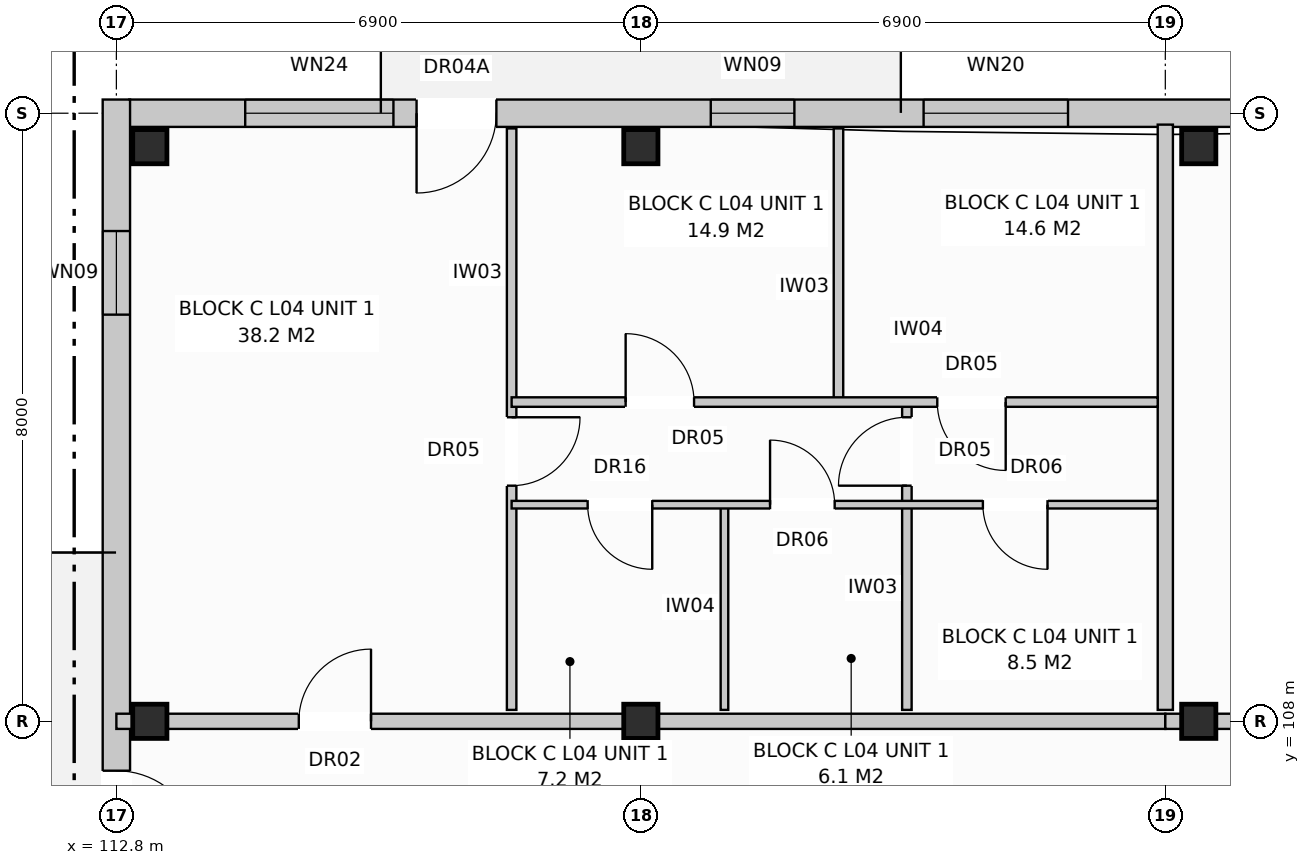
"""IFC4 building model, lengths in metres.
Left out: names, types, materials, properties, quantities, classifications, styles, units other than length and angle.
Written with IfcOpenShell. Run it as: python <this file> out.ifc"""

import sys

from ifc_helpers import new_model, si_unit, direction, frame, frame_2d, origin, origin_with_axes, origin_2d, place, context, subcontext, project, spatial, rectangle, extrude, element, fill, save


model = new_model("IFC4")
c1 = context("Model", 3, precision=1e-05, world=origin(), true_north=direction((0.0, 1.0)))
c2 = subcontext(c1, "Body", "Model", "MODEL_VIEW")
j1 = project(units=[si_unit("LENGTHUNIT", "METRE"), si_unit("PLANEANGLEUNIT", "RADIAN")], contexts=[c1])
p1 = place(None, origin())
s1 = spatial("IfcSite", under=j1, at=p1, CompositionType="ELEMENT")
p2 = place(p1, origin())
s2 = spatial("IfcBuilding", under=s1, at=p2, CompositionType="ELEMENT")
p3 = place(p2, frame((0.0, 0.0, 14.4)))
s3 = spatial("IfcBuildingStorey", under=s2, at=p3, CompositionType="ELEMENT", Elevation=14.4)
for number, where, z_axis, x_axis in (
    (1, (113.24, 108.0, 0.0), (0.0, 0.0, 1.0), (1.0, 0.0, 0.0)),
    (2, (113.24, 115.56, 0.0), (0.0, 0.0, 1.0), (1.0, 0.0, 0.0)),
    (3, (119.7, 108.0, 0.0), (0.0, 0.0, 1.0), (1.0, 0.0, 0.0)),
    (4, (119.7, 115.56, 0.0), (0.0, 0.0, 1.0), (1.0, 0.0, 0.0)),
    (5, (127.04, 108.0, 0.0), (0.0, 0.0, 1.0), (1.0, 0.0, 0.0)),
    (6, (127.04, 115.56, 0.0), (0.0, 0.0, 1.0), (1.0, 0.0, 0.0)),
):
    element("IfcColumn", number, at=place(p3, frame(where, z_axis=z_axis, x_axis=x_axis)), inside=s3, PredefinedType="COLUMN", context=c2, shape_type="SweptSolid", body=[
        extrude(rectangle(XDim=0.45, YDim=0.45, at=origin_2d()), origin(), (0.0, 0.0, 1.0), 3.2),
    ])
p4 = place(p3, frame((112.97, 116.0, 0.0), z_axis=(0.0, 0.0, 1.0), x_axis=(1.0, 0.0, 0.0)))
e7 = element("IfcWall", 7, at=p4, inside=s3, PredefinedType="STANDARD", context=c2, shape_type="SweptSolid", body=[
    extrude(rectangle(XDim=54.86, YDim=0.36, at=frame_2d((27.43, 0.0))), origin(), (0.0, 0.0, 1.0), 2.94),
])
p5 = place(p4, frame((3.779, 0.0, 0.0)))
e8 = element("IfcOpeningElement", 8, at=p5, cuts=e7, PredefinedType="OPENING", context=c2, shape_type="SweptSolid", body=[
    extrude(rectangle(XDim=1.05, YDim=2.12, at=frame_2d((0.525, 1.06))), frame((0.0, 0.192, 0.0), z_axis=(0.0, -1.0, 0.0), x_axis=(1.0, 0.0, 0.0)), (0.0, 0.0, 1.0), 0.384),
])
p6 = place(p4, frame((18.639, 0.0, 0.0)))
e9 = element("IfcOpeningElement", 9, at=p6, cuts=e7, PredefinedType="OPENING", context=c2, shape_type="SweptSolid", body=[
    extrude(rectangle(XDim=1.05, YDim=2.12, at=frame_2d((0.525, 1.06))), frame((0.0, 0.192, 0.0), z_axis=(0.0, -1.0, 0.0), x_axis=(1.0, 0.0, 0.0)), (0.0, 0.0, 1.0), 0.384),
])
p7 = place(p4, frame((29.039, 0.0, 0.0)))
e10 = element("IfcOpeningElement", 10, at=p7, cuts=e7, PredefinedType="OPENING", context=c2, shape_type="SweptSolid", body=[
    extrude(rectangle(XDim=1.05, YDim=2.12, at=frame_2d((0.525, 1.06))), frame((0.0, 0.192, 0.0), z_axis=(0.0, -1.0, 0.0), x_axis=(1.0, 0.0, 0.0)), (0.0, 0.0, 1.0), 0.384),
])
p8 = place(p4, frame((46.45, 0.0, 0.0)))
e11 = element("IfcOpeningElement", 11, at=p8, cuts=e7, PredefinedType="OPENING", context=c2, shape_type="SweptSolid", body=[
    extrude(rectangle(XDim=1.05, YDim=2.12, at=frame_2d((0.525, 1.06))), frame((0.0, 0.192, 0.0), z_axis=(0.0, -1.0, 0.0), x_axis=(1.0, 0.0, 0.0)), (0.0, 0.0, 1.0), 0.384),
])
p9 = place(p4, frame((1.525, 0.0, 0.8)))
e12 = element("IfcOpeningElement", 12, at=p9, cuts=e7, PredefinedType="OPENING", context=c2, shape_type="SweptSolid", body=[
    extrude(rectangle(XDim=1.95, YDim=1.65, at=frame_2d((0.975, 0.825))), frame((0.0, 0.192, 0.0), z_axis=(0.0, -1.0, 0.0), x_axis=(1.0, 0.0, 0.0)), (0.0, 0.0, 1.0), 0.384),
])
p10 = place(p4, frame((7.65, 0.0, 0.72)))
e13 = element("IfcOpeningElement", 13, at=p10, cuts=e7, PredefinedType="OPENING", context=c2, shape_type="SweptSolid", body=[
    extrude(rectangle(XDim=1.1, YDim=1.5, at=frame_2d((0.55, 0.75))), frame((0.0, 0.192, 0.0), z_axis=(0.0, -1.0, 0.0), x_axis=(1.0, 0.0, 0.0)), (0.0, 0.0, 1.0), 0.384),
])
p11 = place(p4, frame((10.45, 0.0, 0.8)))
e14 = element("IfcOpeningElement", 14, at=p11, cuts=e7, PredefinedType="OPENING", context=c2, shape_type="SweptSolid", body=[
    extrude(rectangle(XDim=1.9, YDim=1.85, at=frame_2d((0.95, 0.925))), frame((0.0, 0.192, 0.0), z_axis=(0.0, -1.0, 0.0), x_axis=(1.0, 0.0, 0.0)), (0.0, 0.0, 1.0), 0.384),
])
p12 = place(p4, frame((15.825, 0.0, 0.8)))
e15 = element("IfcOpeningElement", 15, at=p12, cuts=e7, PredefinedType="OPENING", context=c2, shape_type="SweptSolid", body=[
    extrude(rectangle(XDim=1.95, YDim=1.65, at=frame_2d((0.975, 0.825))), frame((0.0, 0.192, 0.0), z_axis=(0.0, -1.0, 0.0), x_axis=(1.0, 0.0, 0.0)), (0.0, 0.0, 1.0), 0.384),
])
p13 = place(p4, frame((21.6, 0.0, 0.8)))
e16 = element("IfcOpeningElement", 16, at=p13, cuts=e7, PredefinedType="OPENING", context=c2, shape_type="SweptSolid", body=[
    extrude(rectangle(XDim=1.8, YDim=1.7, at=frame_2d((0.9, 0.85))), frame((0.0, 0.192, 0.0), z_axis=(0.0, -1.0, 0.0), x_axis=(1.0, 0.0, 0.0)), (0.0, 0.0, 1.0), 0.384),
])
p14 = place(p4, frame((25.6, 0.0, 0.72)))
e17 = element("IfcOpeningElement", 17, at=p14, cuts=e7, PredefinedType="OPENING", context=c2, shape_type="SweptSolid", body=[
    extrude(rectangle(XDim=1.1, YDim=1.5, at=frame_2d((0.55, 0.75))), frame((0.0, 0.192, 0.0), z_axis=(0.0, -1.0, 0.0), x_axis=(1.0, 0.0, 0.0)), (0.0, 0.0, 1.0), 0.384),
])
p15 = place(p4, frame((31.325, 0.0, 0.8)))
e18 = element("IfcOpeningElement", 18, at=p15, cuts=e7, PredefinedType="OPENING", context=c2, shape_type="SweptSolid", body=[
    extrude(rectangle(XDim=1.95, YDim=1.65, at=frame_2d((0.975, 0.825))), frame((0.0, 0.192, 0.0), z_axis=(0.0, -1.0, 0.0), x_axis=(1.0, 0.0, 0.0)), (0.0, 0.0, 1.0), 0.384),
])
p16 = place(p4, frame((35.6, 0.0, 0.8)))
e19 = element("IfcOpeningElement", 19, at=p16, cuts=e7, PredefinedType="OPENING", context=c2, shape_type="SweptSolid", body=[
    extrude(rectangle(XDim=1.8, YDim=1.7, at=frame_2d((0.9, 0.85))), frame((0.0, 0.192, 0.0), z_axis=(0.0, -1.0, 0.0), x_axis=(1.0, 0.0, 0.0)), (0.0, 0.0, 1.0), 0.384),
])
p17 = place(p4, frame((39.25, 0.0, 0.72)))
e20 = element("IfcOpeningElement", 20, at=p17, cuts=e7, PredefinedType="OPENING", context=c2, shape_type="SweptSolid", body=[
    extrude(rectangle(XDim=1.1, YDim=1.5, at=frame_2d((0.55, 0.75))), frame((0.0, 0.192, 0.0), z_axis=(0.0, -1.0, 0.0), x_axis=(1.0, 0.0, 0.0)), (0.0, 0.0, 1.0), 0.384),
])
p18 = place(p4, frame((44.225, 0.0, 0.8)))
e21 = element("IfcOpeningElement", 21, at=p18, cuts=e7, PredefinedType="OPENING", context=c2, shape_type="SweptSolid", body=[
    extrude(rectangle(XDim=1.95, YDim=1.65, at=frame_2d((0.975, 0.825))), frame((0.0, 0.192, 0.0), z_axis=(0.0, -1.0, 0.0), x_axis=(1.0, 0.0, 0.0)), (0.0, 0.0, 1.0), 0.384),
])
p19 = place(p4, frame((49.2, 0.0, 0.8)))
e22 = element("IfcOpeningElement", 22, at=p19, cuts=e7, PredefinedType="OPENING", context=c2, shape_type="SweptSolid", body=[
    extrude(rectangle(XDim=1.8, YDim=1.7, at=frame_2d((0.9, 0.85))), frame((0.0, 0.192, 0.0), z_axis=(0.0, -1.0, 0.0), x_axis=(1.0, 0.0, 0.0)), (0.0, 0.0, 1.0), 0.384),
])
p20 = place(p4, frame((52.95, 0.0, 0.72)))
e23 = element("IfcOpeningElement", 23, at=p20, cuts=e7, PredefinedType="OPENING", context=c2, shape_type="SweptSolid", body=[
    extrude(rectangle(XDim=1.1, YDim=1.5, at=frame_2d((0.55, 0.75))), frame((0.0, 0.192, 0.0), z_axis=(0.0, -1.0, 0.0), x_axis=(1.0, 0.0, 0.0)), (0.0, 0.0, 1.0), 0.384),
])
p21 = place(p3, frame((112.8, 97.42, 0.0), z_axis=(0.0, 0.0, 1.0), x_axis=(0.0, 1.0, 0.0)))
e24 = element("IfcWall", 24, at=p21, inside=s3, PredefinedType="STANDARD", context=c2, shape_type="SweptSolid", body=[
    extrude(rectangle(XDim=18.76, YDim=0.36, at=frame_2d((9.38, 0.0))), origin(), (0.0, 0.0, 1.0), 2.94),
])
p22 = place(p21, frame((8.83, 0.0, 0.0)))
e25 = element("IfcOpeningElement", 25, at=p22, cuts=e24, PredefinedType="OPENING", context=c2, shape_type="SweptSolid", body=[
    extrude(rectangle(XDim=1.1, YDim=2.1, at=frame_2d((0.55, 1.05))), frame((0.0, 0.192, 0.0), z_axis=(0.0, -1.0, 0.0), x_axis=(1.0, 0.0, 0.0)), (0.0, 0.0, 1.0), 0.384),
])
p23 = place(p21, frame((1.73, 0.0, 0.72)))
e26 = element("IfcOpeningElement", 26, at=p23, cuts=e24, PredefinedType="OPENING", context=c2, shape_type="SweptSolid", body=[
    extrude(rectangle(XDim=1.1, YDim=1.5, at=frame_2d((0.55, 0.75))), frame((0.0, 0.192, 0.0), z_axis=(0.0, -1.0, 0.0), x_axis=(1.0, 0.0, 0.0)), (0.0, 0.0, 1.0), 0.384),
])
p24 = place(p21, frame((15.93, 0.0, 0.72)))
e27 = element("IfcOpeningElement", 27, at=p24, cuts=e24, PredefinedType="OPENING", context=c2, shape_type="SweptSolid", body=[
    extrude(rectangle(XDim=1.1, YDim=1.5, at=frame_2d((0.55, 0.75))), frame((0.0, 0.192, 0.0), z_axis=(0.0, -1.0, 0.0), x_axis=(1.0, 0.0, 0.0)), (0.0, 0.0, 1.0), 0.384),
])
p25 = place(p3, frame((126.6, 108.15, 0.0), z_axis=(0.0, 0.0, 1.0), x_axis=(0.0, 1.0, 0.0)))
e28 = element("IfcWall", 28, at=p25, inside=s3, PredefinedType="PARTITIONING", context=c2, shape_type="SweptSolid", body=[
    extrude(rectangle(XDim=7.7, YDim=0.2, at=frame_2d((3.85, 0.0))), origin(), (0.0, 0.0, 1.0), 2.94),
])
p26 = place(p3, frame((112.8, 108.0, 0.0), z_axis=(0.0, 0.0, 1.0), x_axis=(1.0, 0.0, 0.0)))
e29 = element("IfcWall", 29, at=p26, inside=s3, PredefinedType="PARTITIONING", context=c2, shape_type="SweptSolid", body=[
    extrude(rectangle(XDim=13.8, YDim=0.2, at=frame_2d((6.9, 0.0))), origin(), (0.0, 0.0, 1.0), 2.38),
])
p27 = place(p26, frame((2.4, 0.0, 0.0)))
e30 = element("IfcOpeningElement", 30, at=p27, cuts=e29, PredefinedType="OPENING", context=c2, shape_type="SweptSolid", body=[
    extrude(rectangle(XDim=0.95, YDim=2.15, at=frame_2d((0.475, 1.075))), frame((0.0, 0.112, 0.0), z_axis=(0.0, -1.0, 0.0), x_axis=(1.0, 0.0, 0.0)), (0.0, 0.0, 1.0), 0.224),
])
p28 = place(p3, frame((118.0, 108.15, 0.0), z_axis=(0.0, 0.0, 1.0), x_axis=(0.0, 1.0, 0.0)))
e31 = element("IfcWall", 31, at=p28, inside=s3, PredefinedType="PARTITIONING", context=c2, shape_type="SweptSolid", body=[
    extrude(rectangle(XDim=7.65, YDim=0.125, at=frame_2d((3.825, 0.0))), origin(), (0.0, 0.0, 1.0), 2.94),
])
p29 = place(p28, frame((2.95, 0.0, 0.0)))
e32 = element("IfcOpeningElement", 32, at=p29, cuts=e31, PredefinedType="OPENING", context=c2, shape_type="SweptSolid", body=[
    extrude(rectangle(XDim=0.9, YDim=2.1, at=frame_2d((0.45, 1.05))), frame((0.0, 0.074, 0.0), z_axis=(0.0, -1.0, 0.0), x_axis=(1.0, 0.0, 0.0)), (0.0, 0.0, 1.0), 0.149),
])
p30 = place(p3, frame((120.8, 108.15, 0.0), z_axis=(0.0, 0.0, 1.0), x_axis=(0.0, 1.0, 0.0)))
e33 = element("IfcWall", 33, at=p30, inside=s3, PredefinedType="PARTITIONING", context=c2, shape_type="SweptSolid", body=[
    extrude(rectangle(XDim=2.7, YDim=0.1, at=frame_2d((1.35, 0.0))), origin(), (0.0, 0.0, 1.0), 2.94),
])
p31 = place(p3, frame((123.2, 108.15, 0.0), z_axis=(0.0, 0.0, 1.0), x_axis=(0.0, 1.0, 0.0)))
e34 = element("IfcWall", 34, at=p31, inside=s3, PredefinedType="PARTITIONING", context=c2, shape_type="SweptSolid", body=[
    extrude(rectangle(XDim=4.05, YDim=0.125, at=frame_2d((2.025, 0.0))), origin(), (0.0, 0.0, 1.0), 2.94),
])
p32 = place(p31, frame((2.95, 0.0, 0.0)))
e35 = element("IfcOpeningElement", 35, at=p32, cuts=e34, PredefinedType="OPENING", context=c2, shape_type="SweptSolid", body=[
    extrude(rectangle(XDim=0.9, YDim=2.1, at=frame_2d((0.45, 1.05))), frame((0.0, 0.074, 0.0), z_axis=(0.0, -1.0, 0.0), x_axis=(1.0, 0.0, 0.0)), (0.0, 0.0, 1.0), 0.149),
])
p33 = place(p3, frame((122.3, 112.2, 0.0), z_axis=(0.0, 0.0, 1.0), x_axis=(0.0, 1.0, 0.0)))
e36 = element("IfcWall", 36, at=p33, inside=s3, PredefinedType="PARTITIONING", context=c2, shape_type="SweptSolid", body=[
    extrude(rectangle(XDim=3.6, YDim=0.125, at=frame_2d((1.8, 0.0))), origin(), (0.0, 0.0, 1.0), 2.59),
])
p34 = place(p3, frame((118.0, 110.85, 0.0), z_axis=(0.0, 0.0, 1.0), x_axis=(1.0, 0.0, 0.0)))
e37 = element("IfcWall", 37, at=p34, inside=s3, PredefinedType="PARTITIONING", context=c2, shape_type="SweptSolid", body=[
    extrude(rectangle(XDim=8.5, YDim=0.1, at=frame_2d((4.25, 0.0))), origin(), (0.0, 0.0, 1.0), 2.94),
])
p35 = place(p34, frame((1.0, 0.0, 0.0)))
e38 = element("IfcOpeningElement", 38, at=p35, cuts=e37, PredefinedType="OPENING", context=c2, shape_type="SweptSolid", body=[
    extrude(rectangle(XDim=0.85, YDim=2.1, at=frame_2d((0.425, 1.05))), frame((0.0, 0.062, 0.0), z_axis=(0.0, -1.0, 0.0), x_axis=(1.0, 0.0, 0.0)), (0.0, 0.0, 1.0), 0.124),
])
p36 = place(p34, frame((3.4, 0.0, 0.0)))
e39 = element("IfcOpeningElement", 39, at=p36, cuts=e37, PredefinedType="OPENING", context=c2, shape_type="SweptSolid", body=[
    extrude(rectangle(XDim=0.85, YDim=2.05, at=frame_2d((0.425, 1.025))), frame((0.0, 0.062, 0.0), z_axis=(0.0, -1.0, 0.0), x_axis=(1.0, 0.0, 0.0)), (0.0, 0.0, 1.0), 0.124),
])
p37 = place(p34, frame((6.2, 0.0, 0.0)))
e40 = element("IfcOpeningElement", 40, at=p37, cuts=e37, PredefinedType="OPENING", context=c2, shape_type="SweptSolid", body=[
    extrude(rectangle(XDim=0.85, YDim=2.05, at=frame_2d((0.425, 1.025))), frame((0.0, 0.062, 0.0), z_axis=(0.0, -1.0, 0.0), x_axis=(1.0, 0.0, 0.0)), (0.0, 0.0, 1.0), 0.124),
])
p38 = place(p3, frame((118.0, 112.2, 0.0), z_axis=(0.0, 0.0, 1.0), x_axis=(1.0, 0.0, 0.0)))
e41 = element("IfcWall", 41, at=p38, inside=s3, PredefinedType="PARTITIONING", context=c2, shape_type="SweptSolid", body=[
    extrude(rectangle(XDim=8.5, YDim=0.125, at=frame_2d((4.25, 0.0))), origin(), (0.0, 0.0, 1.0), 2.94),
])
p39 = place(p38, frame((1.5, 0.0, 0.0)))
e42 = element("IfcOpeningElement", 42, at=p39, cuts=e41, PredefinedType="OPENING", context=c2, shape_type="SweptSolid", body=[
    extrude(rectangle(XDim=0.9, YDim=2.1, at=frame_2d((0.45, 1.05))), frame((0.0, 0.074, 0.0), z_axis=(0.0, -1.0, 0.0), x_axis=(1.0, 0.0, 0.0)), (0.0, 0.0, 1.0), 0.149),
])
p40 = place(p38, frame((5.6, 0.0, 0.0)))
e43 = element("IfcOpeningElement", 43, at=p40, cuts=e41, PredefinedType="OPENING", context=c2, shape_type="SweptSolid", body=[
    extrude(rectangle(XDim=0.9, YDim=2.1, at=frame_2d((0.45, 1.05))), frame((0.0, 0.074, 0.0), z_axis=(0.0, -1.0, 0.0), x_axis=(1.0, 0.0, 0.0)), (0.0, 0.0, 1.0), 0.149),
])
p41 = place(p3, frame((126.6, 108.0, 0.0), z_axis=(0.0, 0.0, 1.0), x_axis=(1.0, 0.0, 0.0)))
e44 = element("IfcWall", 44, at=p41, inside=s3, PredefinedType="PARTITIONING", context=c2, shape_type="SweptSolid", body=[
    extrude(rectangle(XDim=20.7, YDim=0.2, at=frame_2d((10.35, 0.0))), origin(), (0.0, 0.0, 1.0), 2.38),
])
p42 = place(p41, frame((2.4, 0.0, 0.0)))
e45 = element("IfcOpeningElement", 45, at=p42, cuts=e44, PredefinedType="OPENING", context=c2, shape_type="SweptSolid", body=[
    extrude(rectangle(XDim=0.95, YDim=2.15, at=frame_2d((0.475, 1.075))), frame((0.0, 0.112, 0.0), z_axis=(0.0, -1.0, 0.0), x_axis=(1.0, 0.0, 0.0)), (0.0, 0.0, 1.0), 0.224),
])
p43 = place(p5, frame((1.05, 0.0, 0.0), z_axis=(0.0, 0.0, 1.0), x_axis=(-1.0, 0.0, 0.0)))
e46 = element("IfcDoor", 46, at=p43, inside=s3, OperationType="SINGLE_SWING_LEFT", PredefinedType="DOOR", context=c2, shape_type="SweptSolid", body=[
    extrude(rectangle(XDim=1.05, YDim=2.12, at=frame_2d((0.525, 1.06))), frame((0.0, 0.025, 0.0), z_axis=(0.0, -1.0, 0.0), x_axis=(1.0, 0.0, 0.0)), (0.0, 0.0, 1.0), 0.05),
])
fill(e8, e46)
p44 = place(p9, origin_with_axes())
e47 = element("IfcWindow", 47, at=p44, inside=s3, PartitioningType="SINGLE_PANEL", PredefinedType="WINDOW", context=c2, shape_type="SweptSolid", body=[
    extrude(rectangle(XDim=1.95, YDim=1.65, at=frame_2d((0.975, 0.825))), frame((0.0, 0.03, 0.0), z_axis=(0.0, -1.0, 0.0), x_axis=(1.0, 0.0, 0.0)), (0.0, 0.0, 1.0), 0.06),
])
fill(e12, e47)
p45 = place(p10, origin_with_axes())
e48 = element("IfcWindow", 48, at=p45, inside=s3, PartitioningType="SINGLE_PANEL", PredefinedType="WINDOW", context=c2, shape_type="SweptSolid", body=[
    extrude(rectangle(XDim=1.1, YDim=1.5, at=frame_2d((0.55, 0.75))), frame((0.0, 0.03, 0.0), z_axis=(0.0, -1.0, 0.0), x_axis=(1.0, 0.0, 0.0)), (0.0, 0.0, 1.0), 0.06),
])
fill(e13, e48)
p46 = place(p11, origin_with_axes())
e49 = element("IfcWindow", 49, at=p46, inside=s3, PartitioningType="SINGLE_PANEL", PredefinedType="WINDOW", context=c2, shape_type="SweptSolid", body=[
    extrude(rectangle(XDim=1.9, YDim=1.85, at=frame_2d((0.95, 0.925))), frame((0.0, 0.03, 0.0), z_axis=(0.0, -1.0, 0.0), x_axis=(1.0, 0.0, 0.0)), (0.0, 0.0, 1.0), 0.06),
])
fill(e14, e49)
p47 = place(p22, frame((1.1, 0.0, 0.0), z_axis=(0.0, 0.0, 1.0), x_axis=(-1.0, 0.0, 0.0)))
e50 = element("IfcDoor", 50, at=p47, inside=s3, OperationType="SINGLE_SWING_LEFT", PredefinedType="DOOR", context=c2, shape_type="SweptSolid", body=[
    extrude(rectangle(XDim=1.1, YDim=2.1, at=frame_2d((0.55, 1.05))), frame((0.0, 0.025, 0.0), z_axis=(0.0, -1.0, 0.0), x_axis=(1.0, 0.0, 0.0)), (0.0, 0.0, 1.0), 0.05),
])
fill(e25, e50)
p48 = place(p24, origin_with_axes())
e51 = element("IfcWindow", 51, at=p48, inside=s3, PartitioningType="SINGLE_PANEL", PredefinedType="WINDOW", context=c2, shape_type="SweptSolid", body=[
    extrude(rectangle(XDim=1.1, YDim=1.5, at=frame_2d((0.55, 0.75))), frame((0.0, 0.03, 0.0), z_axis=(0.0, -1.0, 0.0), x_axis=(1.0, 0.0, 0.0)), (0.0, 0.0, 1.0), 0.06),
])
fill(e27, e51)
p49 = place(p27, origin_with_axes())
e52 = element("IfcDoor", 52, at=p49, inside=s3, OperationType="SINGLE_SWING_RIGHT", PredefinedType="DOOR", context=c2, shape_type="SweptSolid", body=[
    extrude(rectangle(XDim=0.95, YDim=2.15, at=frame_2d((0.475, 1.075))), frame((0.0, 0.025, 0.0), z_axis=(0.0, -1.0, 0.0), x_axis=(1.0, 0.0, 0.0)), (0.0, 0.0, 1.0), 0.05),
])
fill(e30, e52)
p50 = place(p29, frame((0.9, 0.0, 0.0), z_axis=(0.0, 0.0, 1.0), x_axis=(-1.0, 0.0, 0.0)))
e53 = element("IfcDoor", 53, at=p50, inside=s3, OperationType="SINGLE_SWING_RIGHT", PredefinedType="DOOR", context=c2, shape_type="SweptSolid", body=[
    extrude(rectangle(XDim=0.9, YDim=2.1, at=frame_2d((0.45, 1.05))), frame((0.0, 0.025, 0.0), z_axis=(0.0, -1.0, 0.0), x_axis=(1.0, 0.0, 0.0)), (0.0, 0.0, 1.0), 0.05),
])
fill(e32, e53)
p51 = place(p32, origin_with_axes())
e54 = element("IfcDoor", 54, at=p51, inside=s3, OperationType="SINGLE_SWING_LEFT", PredefinedType="DOOR", context=c2, shape_type="SweptSolid", body=[
    extrude(rectangle(XDim=0.9, YDim=2.1, at=frame_2d((0.45, 1.05))), frame((0.0, 0.025, 0.0), z_axis=(0.0, -1.0, 0.0), x_axis=(1.0, 0.0, 0.0)), (0.0, 0.0, 1.0), 0.05),
])
fill(e35, e54)
p52 = place(p35, frame((0.85, 0.0, 0.0), z_axis=(0.0, 0.0, 1.0), x_axis=(-1.0, 0.0, 0.0)))
e55 = element("IfcDoor", 55, at=p52, inside=s3, OperationType="SINGLE_SWING_RIGHT", PredefinedType="DOOR", context=c2, shape_type="SweptSolid", body=[
    extrude(rectangle(XDim=0.85, YDim=2.1, at=frame_2d((0.425, 1.05))), frame((0.0, 0.025, 0.0), z_axis=(0.0, -1.0, 0.0), x_axis=(1.0, 0.0, 0.0)), (0.0, 0.0, 1.0), 0.05),
])
fill(e38, e55)
p53 = place(p36, origin_with_axes())
e56 = element("IfcDoor", 56, at=p53, inside=s3, OperationType="SINGLE_SWING_LEFT", PredefinedType="DOOR", context=c2, shape_type="SweptSolid", body=[
    extrude(rectangle(XDim=0.85, YDim=2.05, at=frame_2d((0.425, 1.025))), frame((0.0, 0.025, 0.0), z_axis=(0.0, -1.0, 0.0), x_axis=(1.0, 0.0, 0.0)), (0.0, 0.0, 1.0), 0.05),
])
fill(e39, e56)
p54 = place(p37, frame((0.85, 0.0, 0.0), z_axis=(0.0, 0.0, 1.0), x_axis=(-1.0, 0.0, 0.0)))
e57 = element("IfcDoor", 57, at=p54, inside=s3, OperationType="SINGLE_SWING_RIGHT", PredefinedType="DOOR", context=c2, shape_type="SweptSolid", body=[
    extrude(rectangle(XDim=0.85, YDim=2.05, at=frame_2d((0.425, 1.025))), frame((0.0, 0.025, 0.0), z_axis=(0.0, -1.0, 0.0), x_axis=(1.0, 0.0, 0.0)), (0.0, 0.0, 1.0), 0.05),
])
fill(e40, e57)
p55 = place(p39, origin_with_axes())
e58 = element("IfcDoor", 58, at=p55, inside=s3, OperationType="SINGLE_SWING_LEFT", PredefinedType="DOOR", context=c2, shape_type="SweptSolid", body=[
    extrude(rectangle(XDim=0.9, YDim=2.1, at=frame_2d((0.45, 1.05))), frame((0.0, 0.025, 0.0), z_axis=(0.0, -1.0, 0.0), x_axis=(1.0, 0.0, 0.0)), (0.0, 0.0, 1.0), 0.05),
])
fill(e42, e58)
p56 = place(p40, frame((0.9, 0.0, 0.0), z_axis=(0.0, 0.0, 1.0), x_axis=(-1.0, 0.0, 0.0)))
e59 = element("IfcDoor", 59, at=p56, inside=s3, OperationType="SINGLE_SWING_RIGHT", PredefinedType="DOOR", context=c2, shape_type="SweptSolid", body=[
    extrude(rectangle(XDim=0.9, YDim=2.1, at=frame_2d((0.45, 1.05))), frame((0.0, 0.025, 0.0), z_axis=(0.0, -1.0, 0.0), x_axis=(1.0, 0.0, 0.0)), (0.0, 0.0, 1.0), 0.05),
])
fill(e43, e59)
save(model, sys.argv[1])
